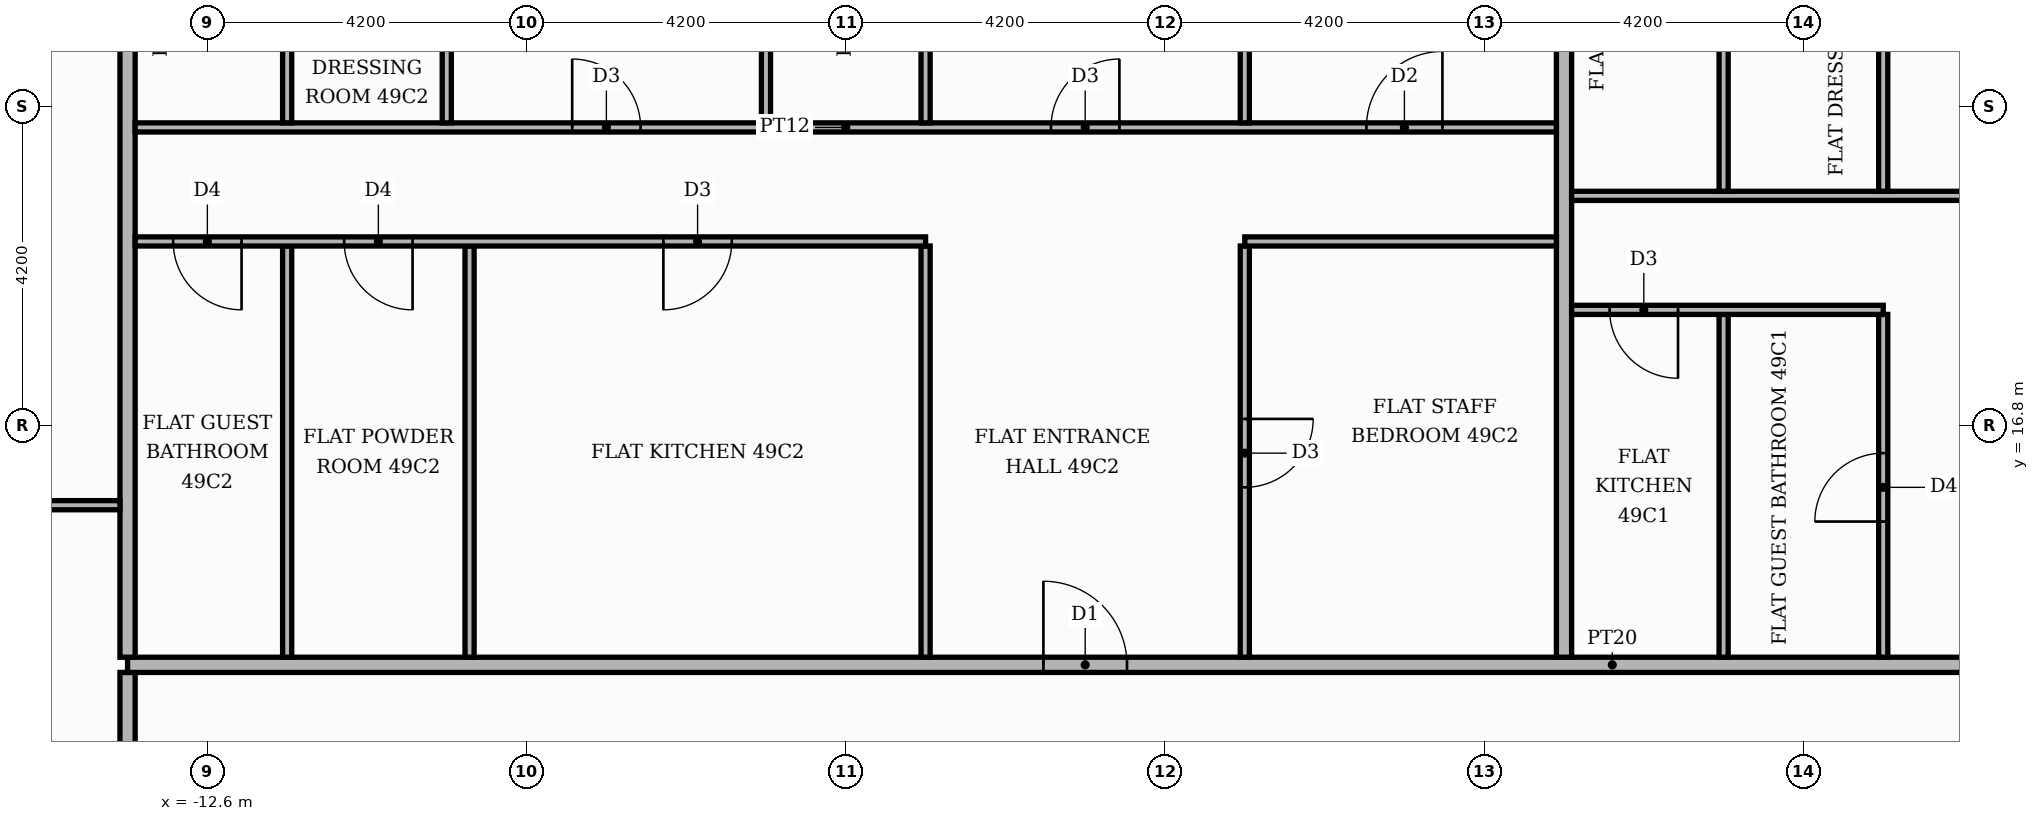
"""IFC4 building model, lengths in metres.
Left out: names, types, materials, properties, quantities, classifications, styles, units other than length and angle.
Written with IfcOpenShell. Run it as: python <this file> out.ifc"""

import sys

from ifc_helpers import new_model, si_unit, direction, frame, frame_2d, origin, place, context, subcontext, project, spatial, rectangle, extrude, element, fill, save


model = new_model("IFC4")
c1 = context("Model", 3, precision=1e-05, world=origin(), true_north=direction((0.0, 1.0)))
c2 = subcontext(c1, "Body", "Model", "MODEL_VIEW")
j1 = project(units=[si_unit("LENGTHUNIT", "METRE"), si_unit("PLANEANGLEUNIT", "RADIAN")], contexts=[c1])
p1 = place(None, origin())
s1 = spatial("IfcSite", under=j1, at=p1, CompositionType="ELEMENT")
p2 = place(p1, origin())
s2 = spatial("IfcBuilding", under=s1, at=p2, CompositionType="ELEMENT")
p3 = place(p2, frame((0.0, 0.0, 207.9)))
s3 = spatial("IfcBuildingStorey", under=s2, at=p3, CompositionType="ELEMENT", Elevation=207.9)
p4 = place(p3, frame((-13.65, -13.55, 0.0), z_axis=(0.0, 0.0, 1.0), x_axis=(0.0, 1.0, 0.0)))
e1 = element("IfcWall", 1, at=p4, inside=s3, PredefinedType="PARTITIONING", context=c2, shape_type="SweptSolid", body=[
    extrude(rectangle(XDim=27.1, YDim=0.2, at=frame_2d((13.55, 0.0))), origin(), (0.0, 0.0, 1.0), 3.48),
])
p5 = place(p4, frame((24.55, 0.0, 0.0)))
e2 = element("IfcOpeningElement", 2, at=p5, cuts=e1, PredefinedType="OPENING", context=c2, shape_type="SweptSolid", body=[
    extrude(rectangle(XDim=1.1, YDim=2.4, at=frame_2d((0.55, 1.2))), frame((0.0, 0.11, 0.0), z_axis=(0.0, -1.0, 0.0), x_axis=(1.0, 0.0, 0.0)), (0.0, 0.0, 1.0), 0.22),
])
p6 = place(p3, frame((-13.65, 13.65, 0.0), z_axis=(0.0, 0.0, 1.0), x_axis=(1.0, 0.0, 0.0)))
e3 = element("IfcWall", 3, at=p6, inside=s3, PredefinedType="PARTITIONING", context=c2, shape_type="SweptSolid", body=[
    extrude(rectangle(XDim=39.07, YDim=0.2, at=frame_2d((19.535, 0.0))), origin(), (0.0, 0.0, 1.0), 3.48),
])
p7 = place(p6, frame((24.65, 0.0, 0.0)))
e4 = element("IfcOpeningElement", 4, at=p7, cuts=e3, PredefinedType="OPENING", context=c2, shape_type="SweptSolid", body=[
    extrude(rectangle(XDim=1.1, YDim=2.4, at=frame_2d((0.55, 1.2))), frame((0.0, 0.11, 0.0), z_axis=(0.0, -1.0, 0.0), x_axis=(1.0, 0.0, 0.0)), (0.0, 0.0, 1.0), 0.22),
])
p8 = place(p6, frame((12.05, 0.0, 0.0)))
e5 = element("IfcOpeningElement", 5, at=p8, cuts=e3, PredefinedType="OPENING", context=c2, shape_type="SweptSolid", body=[
    extrude(rectangle(XDim=1.1, YDim=2.4, at=frame_2d((0.55, 1.2))), frame((0.0, 0.11, 0.0), z_axis=(0.0, -1.0, 0.0), x_axis=(1.0, 0.0, 0.0)), (0.0, 0.0, 1.0), 0.22),
])
p9 = place(p3, frame((-13.65, 13.75, 0.0), z_axis=(0.0, 0.0, 1.0), x_axis=(0.0, 1.0, 0.0)))
e6 = element("IfcWall", 6, at=p9, inside=s3, PredefinedType="PARTITIONING", context=c2, shape_type="SweptSolid", body=[
    extrude(rectangle(XDim=11.67, YDim=0.2, at=frame_2d((5.835, 0.0))), origin(), (0.0, 0.0, 1.0), 3.48),
])
for number, where, z_axis, x_axis in (
    (7, (-11.55, 13.75, 0.0), (0.0, 0.0, 1.0), (0.0, 1.0, 0.0)),
    (8, (-9.15, 13.75, 0.0), (0.0, 0.0, 1.0), (0.0, 1.0, 0.0)),
    (9, (-3.15, 13.75, 0.0), (0.0, 0.0, 1.0), (0.0, 1.0, 0.0)),
):
    element("IfcWall", number, at=place(p3, frame(where, z_axis=z_axis, x_axis=x_axis)), inside=s3, PredefinedType="PARTITIONING", context=c2, shape_type="SweptSolid", body=[
        extrude(rectangle(XDim=5.41, YDim=0.12, at=frame_2d((2.705, 0.0))), origin(), (0.0, 0.0, 1.0), 3.48),
    ])
p10 = place(p3, frame((1.05, 13.75, 0.0), z_axis=(0.0, 0.0, 1.0), x_axis=(0.0, 1.0, 0.0)))
e10 = element("IfcWall", 10, at=p10, inside=s3, PredefinedType="PARTITIONING", context=c2, shape_type="SweptSolid", body=[
    extrude(rectangle(XDim=5.41, YDim=0.12, at=frame_2d((2.705, 0.0))), origin(), (0.0, 0.0, 1.0), 3.48),
])
p11 = place(p10, frame((2.235, 0.0, 0.0)))
e11 = element("IfcOpeningElement", 11, at=p11, cuts=e10, PredefinedType="OPENING", context=c2, shape_type="SweptSolid", body=[
    extrude(rectangle(XDim=0.9, YDim=2.1, at=frame_2d((0.45, 1.05))), frame((0.0, 0.07, 0.0), z_axis=(0.0, -1.0, 0.0), x_axis=(1.0, 0.0, 0.0)), (0.0, 0.0, 1.0), 0.14),
])
p12 = place(p3, frame((5.25, 13.75, 0.0), z_axis=(0.0, 0.0, 1.0), x_axis=(0.0, 1.0, 0.0)))
e12 = element("IfcWall", 12, at=p12, inside=s3, PredefinedType="PARTITIONING", context=c2, shape_type="SweptSolid", body=[
    extrude(rectangle(XDim=11.67, YDim=0.2, at=frame_2d((5.835, 0.0))), origin(), (0.0, 0.0, 1.0), 3.48),
])
p13 = place(p3, frame((7.35, 13.75, 0.0), z_axis=(0.0, 0.0, 1.0), x_axis=(0.0, 1.0, 0.0)))
e13 = element("IfcWall", 13, at=p13, inside=s3, PredefinedType="PARTITIONING", context=c2, shape_type="SweptSolid", body=[
    extrude(rectangle(XDim=4.51, YDim=0.12, at=frame_2d((2.255, 0.0))), origin(), (0.0, 0.0, 1.0), 3.48),
])
p14 = place(p3, frame((9.45, 13.75, 0.0), z_axis=(0.0, 0.0, 1.0), x_axis=(0.0, 1.0, 0.0)))
e14 = element("IfcWall", 14, at=p14, inside=s3, PredefinedType="PARTITIONING", context=c2, shape_type="SweptSolid", body=[
    extrude(rectangle(XDim=4.51, YDim=0.12, at=frame_2d((2.255, 0.0))), origin(), (0.0, 0.0, 1.0), 3.48),
])
p15 = place(p14, frame((1.785, 0.0, 0.0)))
e15 = element("IfcOpeningElement", 15, at=p15, cuts=e14, PredefinedType="OPENING", context=c2, shape_type="SweptSolid", body=[
    extrude(rectangle(XDim=0.9, YDim=2.1, at=frame_2d((0.45, 1.05))), frame((0.0, 0.07, 0.0), z_axis=(0.0, -1.0, 0.0), x_axis=(1.0, 0.0, 0.0)), (0.0, 0.0, 1.0), 0.14),
])
p16 = place(p3, frame((-20.12, 15.75, 0.0), z_axis=(0.0, 0.0, 1.0), x_axis=(1.0, 0.0, 0.0)))
e16 = element("IfcWall", 16, at=p16, inside=s3, PredefinedType="PARTITIONING", context=c2, shape_type="SweptSolid", body=[
    extrude(rectangle(XDim=6.37, YDim=0.12, at=frame_2d((3.185, 0.0))), origin(), (0.0, 0.0, 1.0), 3.48),
])
p17 = place(p16, frame((2.785, 0.0, 0.0)))
e17 = element("IfcOpeningElement", 17, at=p17, cuts=e16, PredefinedType="OPENING", context=c2, shape_type="SweptSolid", body=[
    extrude(rectangle(XDim=0.9, YDim=2.1, at=frame_2d((0.45, 1.05))), frame((0.0, 0.07, 0.0), z_axis=(0.0, -1.0, 0.0), x_axis=(1.0, 0.0, 0.0)), (0.0, 0.0, 1.0), 0.14),
])
p18 = place(p3, frame((5.35, 18.32, 0.0), z_axis=(0.0, 0.0, 1.0), x_axis=(1.0, 0.0, 0.0)))
e18 = element("IfcWall", 18, at=p18, inside=s3, PredefinedType="PARTITIONING", context=c2, shape_type="SweptSolid", body=[
    extrude(rectangle(XDim=4.1, YDim=0.12, at=frame_2d((2.05, 0.0))), origin(), (0.0, 0.0, 1.0), 3.48),
])
p19 = place(p18, frame((0.5, 0.0, 0.0)))
e19 = element("IfcOpeningElement", 19, at=p19, cuts=e18, PredefinedType="OPENING", context=c2, shape_type="SweptSolid", body=[
    extrude(rectangle(XDim=0.9, YDim=2.1, at=frame_2d((0.45, 1.05))), frame((0.0, 0.07, 0.0), z_axis=(0.0, -1.0, 0.0), x_axis=(1.0, 0.0, 0.0)), (0.0, 0.0, 1.0), 0.14),
])
p20 = place(p3, frame((-13.55, 19.22, 0.0), z_axis=(0.0, 0.0, 1.0), x_axis=(1.0, 0.0, 0.0)))
e20 = element("IfcWall", 20, at=p20, inside=s3, PredefinedType="PARTITIONING", context=c2, shape_type="SweptSolid", body=[
    extrude(rectangle(XDim=10.4, YDim=0.12, at=frame_2d((5.2, 0.0))), origin(), (0.0, 0.0, 1.0), 3.48),
])
p21 = place(p20, frame((6.95, 0.0, 0.0)))
e21 = element("IfcOpeningElement", 21, at=p21, cuts=e20, PredefinedType="OPENING", context=c2, shape_type="SweptSolid", body=[
    extrude(rectangle(XDim=0.9, YDim=2.1, at=frame_2d((0.45, 1.05))), frame((0.0, 0.07, 0.0), z_axis=(0.0, -1.0, 0.0), x_axis=(1.0, 0.0, 0.0)), (0.0, 0.0, 1.0), 0.14),
])
p22 = place(p20, frame((2.75, 0.0, 0.0)))
e22 = element("IfcOpeningElement", 22, at=p22, cuts=e20, PredefinedType="OPENING", context=c2, shape_type="SweptSolid", body=[
    extrude(rectangle(XDim=0.9, YDim=2.1, at=frame_2d((0.45, 1.05))), frame((0.0, 0.07, 0.0), z_axis=(0.0, -1.0, 0.0), x_axis=(1.0, 0.0, 0.0)), (0.0, 0.0, 1.0), 0.14),
])
p23 = place(p20, frame((0.5, 0.0, 0.0)))
e23 = element("IfcOpeningElement", 23, at=p23, cuts=e20, PredefinedType="OPENING", context=c2, shape_type="SweptSolid", body=[
    extrude(rectangle(XDim=0.9, YDim=2.1, at=frame_2d((0.45, 1.05))), frame((0.0, 0.07, 0.0), z_axis=(0.0, -1.0, 0.0), x_axis=(1.0, 0.0, 0.0)), (0.0, 0.0, 1.0), 0.14),
])
p24 = place(p3, frame((1.05, 19.22, 0.0), z_axis=(0.0, 0.0, 1.0), x_axis=(1.0, 0.0, 0.0)))
e24 = element("IfcWall", 24, at=p24, inside=s3, PredefinedType="PARTITIONING", context=c2, shape_type="SweptSolid", body=[
    extrude(rectangle(XDim=4.1, YDim=0.12, at=frame_2d((2.05, 0.0))), origin(), (0.0, 0.0, 1.0), 3.48),
])
p25 = place(p3, frame((5.35, 19.82, 0.0), z_axis=(0.0, 0.0, 1.0), x_axis=(1.0, 0.0, 0.0)))
e25 = element("IfcWall", 25, at=p25, inside=s3, PredefinedType="PARTITIONING", context=c2, shape_type="SweptSolid", body=[
    extrude(rectangle(XDim=12.25, YDim=0.12, at=frame_2d((6.125, 0.0))), origin(), (0.0, 0.0, 1.0), 3.48),
])
p26 = place(p25, frame((8.85, 0.0, 0.0)))
e26 = element("IfcOpeningElement", 26, at=p26, cuts=e25, PredefinedType="OPENING", context=c2, shape_type="SweptSolid", body=[
    extrude(rectangle(XDim=1.0, YDim=2.1, at=frame_2d((0.5, 1.05))), frame((0.0, 0.07, 0.0), z_axis=(0.0, -1.0, 0.0), x_axis=(1.0, 0.0, 0.0)), (0.0, 0.0, 1.0), 0.14),
])
p27 = place(p25, frame((5.75, 0.0, 0.0)))
e27 = element("IfcOpeningElement", 27, at=p27, cuts=e25, PredefinedType="OPENING", context=c2, shape_type="SweptSolid", body=[
    extrude(rectangle(XDim=0.9, YDim=2.1, at=frame_2d((0.45, 1.05))), frame((0.0, 0.07, 0.0), z_axis=(0.0, -1.0, 0.0), x_axis=(1.0, 0.0, 0.0)), (0.0, 0.0, 1.0), 0.14),
])
p28 = place(p3, frame((7.35, 19.88, 0.0), z_axis=(0.0, 0.0, 1.0), x_axis=(0.0, 1.0, 0.0)))
e28 = element("IfcWall", 28, at=p28, inside=s3, PredefinedType="PARTITIONING", context=c2, shape_type="SweptSolid", body=[
    extrude(rectangle(XDim=5.54, YDim=0.12, at=frame_2d((2.77, 0.0))), origin(), (0.0, 0.0, 1.0), 3.48),
])
p29 = place(p28, frame((2.44, 0.0, 0.0)))
e29 = element("IfcOpeningElement", 29, at=p29, cuts=e28, PredefinedType="OPENING", context=c2, shape_type="SweptSolid", body=[
    extrude(rectangle(XDim=0.9, YDim=2.1, at=frame_2d((0.45, 1.05))), frame((0.0, 0.07, 0.0), z_axis=(0.0, -1.0, 0.0), x_axis=(1.0, 0.0, 0.0)), (0.0, 0.0, 1.0), 0.14),
])
p30 = place(p3, frame((9.45, 19.88, 0.0), z_axis=(0.0, 0.0, 1.0), x_axis=(0.0, 1.0, 0.0)))
e30 = element("IfcWall", 30, at=p30, inside=s3, PredefinedType="PARTITIONING", context=c2, shape_type="SweptSolid", body=[
    extrude(rectangle(XDim=5.54, YDim=0.12, at=frame_2d((2.77, 0.0))), origin(), (0.0, 0.0, 1.0), 3.48),
])
p31 = place(p30, frame((2.44, 0.0, 0.0)))
e31 = element("IfcOpeningElement", 31, at=p31, cuts=e30, PredefinedType="OPENING", context=c2, shape_type="SweptSolid", body=[
    extrude(rectangle(XDim=0.9, YDim=2.1, at=frame_2d((0.45, 1.05))), frame((0.0, 0.07, 0.0), z_axis=(0.0, -1.0, 0.0), x_axis=(1.0, 0.0, 0.0)), (0.0, 0.0, 1.0), 0.14),
])
p32 = place(p3, frame((-13.55, 20.72, 0.0), z_axis=(0.0, 0.0, 1.0), x_axis=(1.0, 0.0, 0.0)))
e32 = element("IfcWall", 32, at=p32, inside=s3, PredefinedType="PARTITIONING", context=c2, shape_type="SweptSolid", body=[
    extrude(rectangle(XDim=18.7, YDim=0.12, at=frame_2d((9.35, 0.0))), origin(), (0.0, 0.0, 1.0), 3.48),
])
p33 = place(p32, frame((16.2, 0.0, 0.0)))
e33 = element("IfcOpeningElement", 33, at=p33, cuts=e32, PredefinedType="OPENING", context=c2, shape_type="SweptSolid", body=[
    extrude(rectangle(XDim=1.0, YDim=2.1, at=frame_2d((0.5, 1.05))), frame((0.0, 0.07, 0.0), z_axis=(0.0, -1.0, 0.0), x_axis=(1.0, 0.0, 0.0)), (0.0, 0.0, 1.0), 0.14),
])
p34 = place(p32, frame((12.05, 0.0, 0.0)))
e34 = element("IfcOpeningElement", 34, at=p34, cuts=e32, PredefinedType="OPENING", context=c2, shape_type="SweptSolid", body=[
    extrude(rectangle(XDim=0.9, YDim=2.1, at=frame_2d((0.45, 1.05))), frame((0.0, 0.07, 0.0), z_axis=(0.0, -1.0, 0.0), x_axis=(1.0, 0.0, 0.0)), (0.0, 0.0, 1.0), 0.14),
])
p35 = place(p32, frame((5.75, 0.0, 0.0)))
e35 = element("IfcOpeningElement", 35, at=p35, cuts=e32, PredefinedType="OPENING", context=c2, shape_type="SweptSolid", body=[
    extrude(rectangle(XDim=0.9, YDim=2.1, at=frame_2d((0.45, 1.05))), frame((0.0, 0.07, 0.0), z_axis=(0.0, -1.0, 0.0), x_axis=(1.0, 0.0, 0.0)), (0.0, 0.0, 1.0), 0.14),
])
p36 = place(p3, frame((-11.55, 20.78, 0.0), z_axis=(0.0, 0.0, 1.0), x_axis=(0.0, 1.0, 0.0)))
e36 = element("IfcWall", 36, at=p36, inside=s3, PredefinedType="PARTITIONING", context=c2, shape_type="SweptSolid", body=[
    extrude(rectangle(XDim=4.64, YDim=0.12, at=frame_2d((2.32, 0.0))), origin(), (0.0, 0.0, 1.0), 3.48),
])
p37 = place(p36, frame((1.99, 0.0, 0.0)))
e37 = element("IfcOpeningElement", 37, at=p37, cuts=e36, PredefinedType="OPENING", context=c2, shape_type="SweptSolid", body=[
    extrude(rectangle(XDim=0.9, YDim=2.1, at=frame_2d((0.45, 1.05))), frame((0.0, 0.07, 0.0), z_axis=(0.0, -1.0, 0.0), x_axis=(1.0, 0.0, 0.0)), (0.0, 0.0, 1.0), 0.14),
])
p38 = place(p3, frame((-9.45, 20.78, 0.0), z_axis=(0.0, 0.0, 1.0), x_axis=(0.0, 1.0, 0.0)))
e38 = element("IfcWall", 38, at=p38, inside=s3, PredefinedType="PARTITIONING", context=c2, shape_type="SweptSolid", body=[
    extrude(rectangle(XDim=4.64, YDim=0.12, at=frame_2d((2.32, 0.0))), origin(), (0.0, 0.0, 1.0), 3.48),
])
p39 = place(p38, frame((1.99, 0.0, 0.0)))
e39 = element("IfcOpeningElement", 39, at=p39, cuts=e38, PredefinedType="OPENING", context=c2, shape_type="SweptSolid", body=[
    extrude(rectangle(XDim=0.9, YDim=2.1, at=frame_2d((0.45, 1.05))), frame((0.0, 0.07, 0.0), z_axis=(0.0, -1.0, 0.0), x_axis=(1.0, 0.0, 0.0)), (0.0, 0.0, 1.0), 0.14),
])
p40 = place(p3, frame((-5.25, 20.78, 0.0), z_axis=(0.0, 0.0, 1.0), x_axis=(0.0, 1.0, 0.0)))
e40 = element("IfcWall", 40, at=p40, inside=s3, PredefinedType="PARTITIONING", context=c2, shape_type="SweptSolid", body=[
    extrude(rectangle(XDim=4.64, YDim=0.12, at=frame_2d((2.32, 0.0))), origin(), (0.0, 0.0, 1.0), 3.48),
])
p41 = place(p3, frame((-3.15, 20.78, 0.0), z_axis=(0.0, 0.0, 1.0), x_axis=(0.0, 1.0, 0.0)))
e41 = element("IfcWall", 41, at=p41, inside=s3, PredefinedType="PARTITIONING", context=c2, shape_type="SweptSolid", body=[
    extrude(rectangle(XDim=4.64, YDim=0.12, at=frame_2d((2.32, 0.0))), origin(), (0.0, 0.0, 1.0), 3.48),
])
p42 = place(p41, frame((1.99, 0.0, 0.0)))
e42 = element("IfcOpeningElement", 42, at=p42, cuts=e41, PredefinedType="OPENING", context=c2, shape_type="SweptSolid", body=[
    extrude(rectangle(XDim=0.9, YDim=2.1, at=frame_2d((0.45, 1.05))), frame((0.0, 0.07, 0.0), z_axis=(0.0, -1.0, 0.0), x_axis=(1.0, 0.0, 0.0)), (0.0, 0.0, 1.0), 0.14),
])
p43 = place(p3, frame((1.05, 20.78, 0.0), z_axis=(0.0, 0.0, 1.0), x_axis=(0.0, 1.0, 0.0)))
e43 = element("IfcWall", 43, at=p43, inside=s3, PredefinedType="PARTITIONING", context=c2, shape_type="SweptSolid", body=[
    extrude(rectangle(XDim=4.64, YDim=0.12, at=frame_2d((2.32, 0.0))), origin(), (0.0, 0.0, 1.0), 3.48),
])
p44 = place(p15, origin())
e44 = element("IfcDoor", 44, at=p44, inside=s3, OperationType="SINGLE_SWING_LEFT", PredefinedType="DOOR", context=c2, shape_type="SweptSolid", body=[
    extrude(rectangle(XDim=0.9, YDim=2.1, at=frame_2d((0.45, 1.05))), frame((0.0, 0.025, 0.0), z_axis=(0.0, -1.0, 0.0), x_axis=(1.0, 0.0, 0.0)), (0.0, 0.0, 1.0), 0.05),
])
fill(e15, e44)
p45 = place(p19, frame((0.9, 0.0, 0.0), z_axis=(0.0, 0.0, 1.0), x_axis=(-1.0, 0.0, 0.0)))
e45 = element("IfcDoor", 45, at=p45, inside=s3, OperationType="SINGLE_SWING_RIGHT", PredefinedType="DOOR", context=c2, shape_type="SweptSolid", body=[
    extrude(rectangle(XDim=0.9, YDim=2.1, at=frame_2d((0.45, 1.05))), frame((0.0, 0.025, 0.0), z_axis=(0.0, -1.0, 0.0), x_axis=(1.0, 0.0, 0.0)), (0.0, 0.0, 1.0), 0.05),
])
fill(e19, e45)
p46 = place(p8, origin())
e46 = element("IfcDoor", 46, at=p46, inside=s3, OperationType="SINGLE_SWING_LEFT", PredefinedType="DOOR", context=c2, shape_type="SweptSolid", body=[
    extrude(rectangle(XDim=1.1, YDim=2.4, at=frame_2d((0.55, 1.2))), frame((0.0, 0.025, 0.0), z_axis=(0.0, -1.0, 0.0), x_axis=(1.0, 0.0, 0.0)), (0.0, 0.0, 1.0), 0.05),
])
fill(e5, e46)
p47 = place(p11, frame((0.9, 0.0, 0.0), z_axis=(0.0, 0.0, 1.0), x_axis=(-1.0, 0.0, 0.0)))
e47 = element("IfcDoor", 47, at=p47, inside=s3, OperationType="SINGLE_SWING_RIGHT", PredefinedType="DOOR", context=c2, shape_type="SweptSolid", body=[
    extrude(rectangle(XDim=0.9, YDim=2.1, at=frame_2d((0.45, 1.05))), frame((0.0, 0.025, 0.0), z_axis=(0.0, -1.0, 0.0), x_axis=(1.0, 0.0, 0.0)), (0.0, 0.0, 1.0), 0.05),
])
fill(e11, e47)
p48 = place(p21, frame((0.9, 0.0, 0.0), z_axis=(0.0, 0.0, 1.0), x_axis=(-1.0, 0.0, 0.0)))
e48 = element("IfcDoor", 48, at=p48, inside=s3, OperationType="SINGLE_SWING_LEFT", PredefinedType="DOOR", context=c2, shape_type="SweptSolid", body=[
    extrude(rectangle(XDim=0.9, YDim=2.1, at=frame_2d((0.45, 1.05))), frame((0.0, 0.025, 0.0), z_axis=(0.0, -1.0, 0.0), x_axis=(1.0, 0.0, 0.0)), (0.0, 0.0, 1.0), 0.05),
])
fill(e21, e48)
p49 = place(p22, frame((0.9, 0.0, 0.0), z_axis=(0.0, 0.0, 1.0), x_axis=(-1.0, 0.0, 0.0)))
e49 = element("IfcDoor", 49, at=p49, inside=s3, OperationType="SINGLE_SWING_RIGHT", PredefinedType="DOOR", context=c2, shape_type="SweptSolid", body=[
    extrude(rectangle(XDim=0.9, YDim=2.1, at=frame_2d((0.45, 1.05))), frame((0.0, 0.025, 0.0), z_axis=(0.0, -1.0, 0.0), x_axis=(1.0, 0.0, 0.0)), (0.0, 0.0, 1.0), 0.05),
])
fill(e22, e49)
p50 = place(p23, frame((0.9, 0.0, 0.0), z_axis=(0.0, 0.0, 1.0), x_axis=(-1.0, 0.0, 0.0)))
e50 = element("IfcDoor", 50, at=p50, inside=s3, OperationType="SINGLE_SWING_RIGHT", PredefinedType="DOOR", context=c2, shape_type="SweptSolid", body=[
    extrude(rectangle(XDim=0.9, YDim=2.1, at=frame_2d((0.45, 1.05))), frame((0.0, 0.025, 0.0), z_axis=(0.0, -1.0, 0.0), x_axis=(1.0, 0.0, 0.0)), (0.0, 0.0, 1.0), 0.05),
])
fill(e23, e50)
p51 = place(p33, origin())
e51 = element("IfcDoor", 51, at=p51, inside=s3, OperationType="SINGLE_SWING_RIGHT", PredefinedType="DOOR", context=c2, shape_type="SweptSolid", body=[
    extrude(rectangle(XDim=1.0, YDim=2.1, at=frame_2d((0.5, 1.05))), frame((0.0, 0.025, 0.0), z_axis=(0.0, -1.0, 0.0), x_axis=(1.0, 0.0, 0.0)), (0.0, 0.0, 1.0), 0.05),
])
fill(e33, e51)
p52 = place(p34, origin())
e52 = element("IfcDoor", 52, at=p52, inside=s3, OperationType="SINGLE_SWING_RIGHT", PredefinedType="DOOR", context=c2, shape_type="SweptSolid", body=[
    extrude(rectangle(XDim=0.9, YDim=2.1, at=frame_2d((0.45, 1.05))), frame((0.0, 0.025, 0.0), z_axis=(0.0, -1.0, 0.0), x_axis=(1.0, 0.0, 0.0)), (0.0, 0.0, 1.0), 0.05),
])
fill(e34, e52)
p53 = place(p35, origin())
e53 = element("IfcDoor", 53, at=p53, inside=s3, OperationType="SINGLE_SWING_LEFT", PredefinedType="DOOR", context=c2, shape_type="SweptSolid", body=[
    extrude(rectangle(XDim=0.9, YDim=2.1, at=frame_2d((0.45, 1.05))), frame((0.0, 0.025, 0.0), z_axis=(0.0, -1.0, 0.0), x_axis=(1.0, 0.0, 0.0)), (0.0, 0.0, 1.0), 0.05),
])
fill(e35, e53)
save(model, sys.argv[1])
